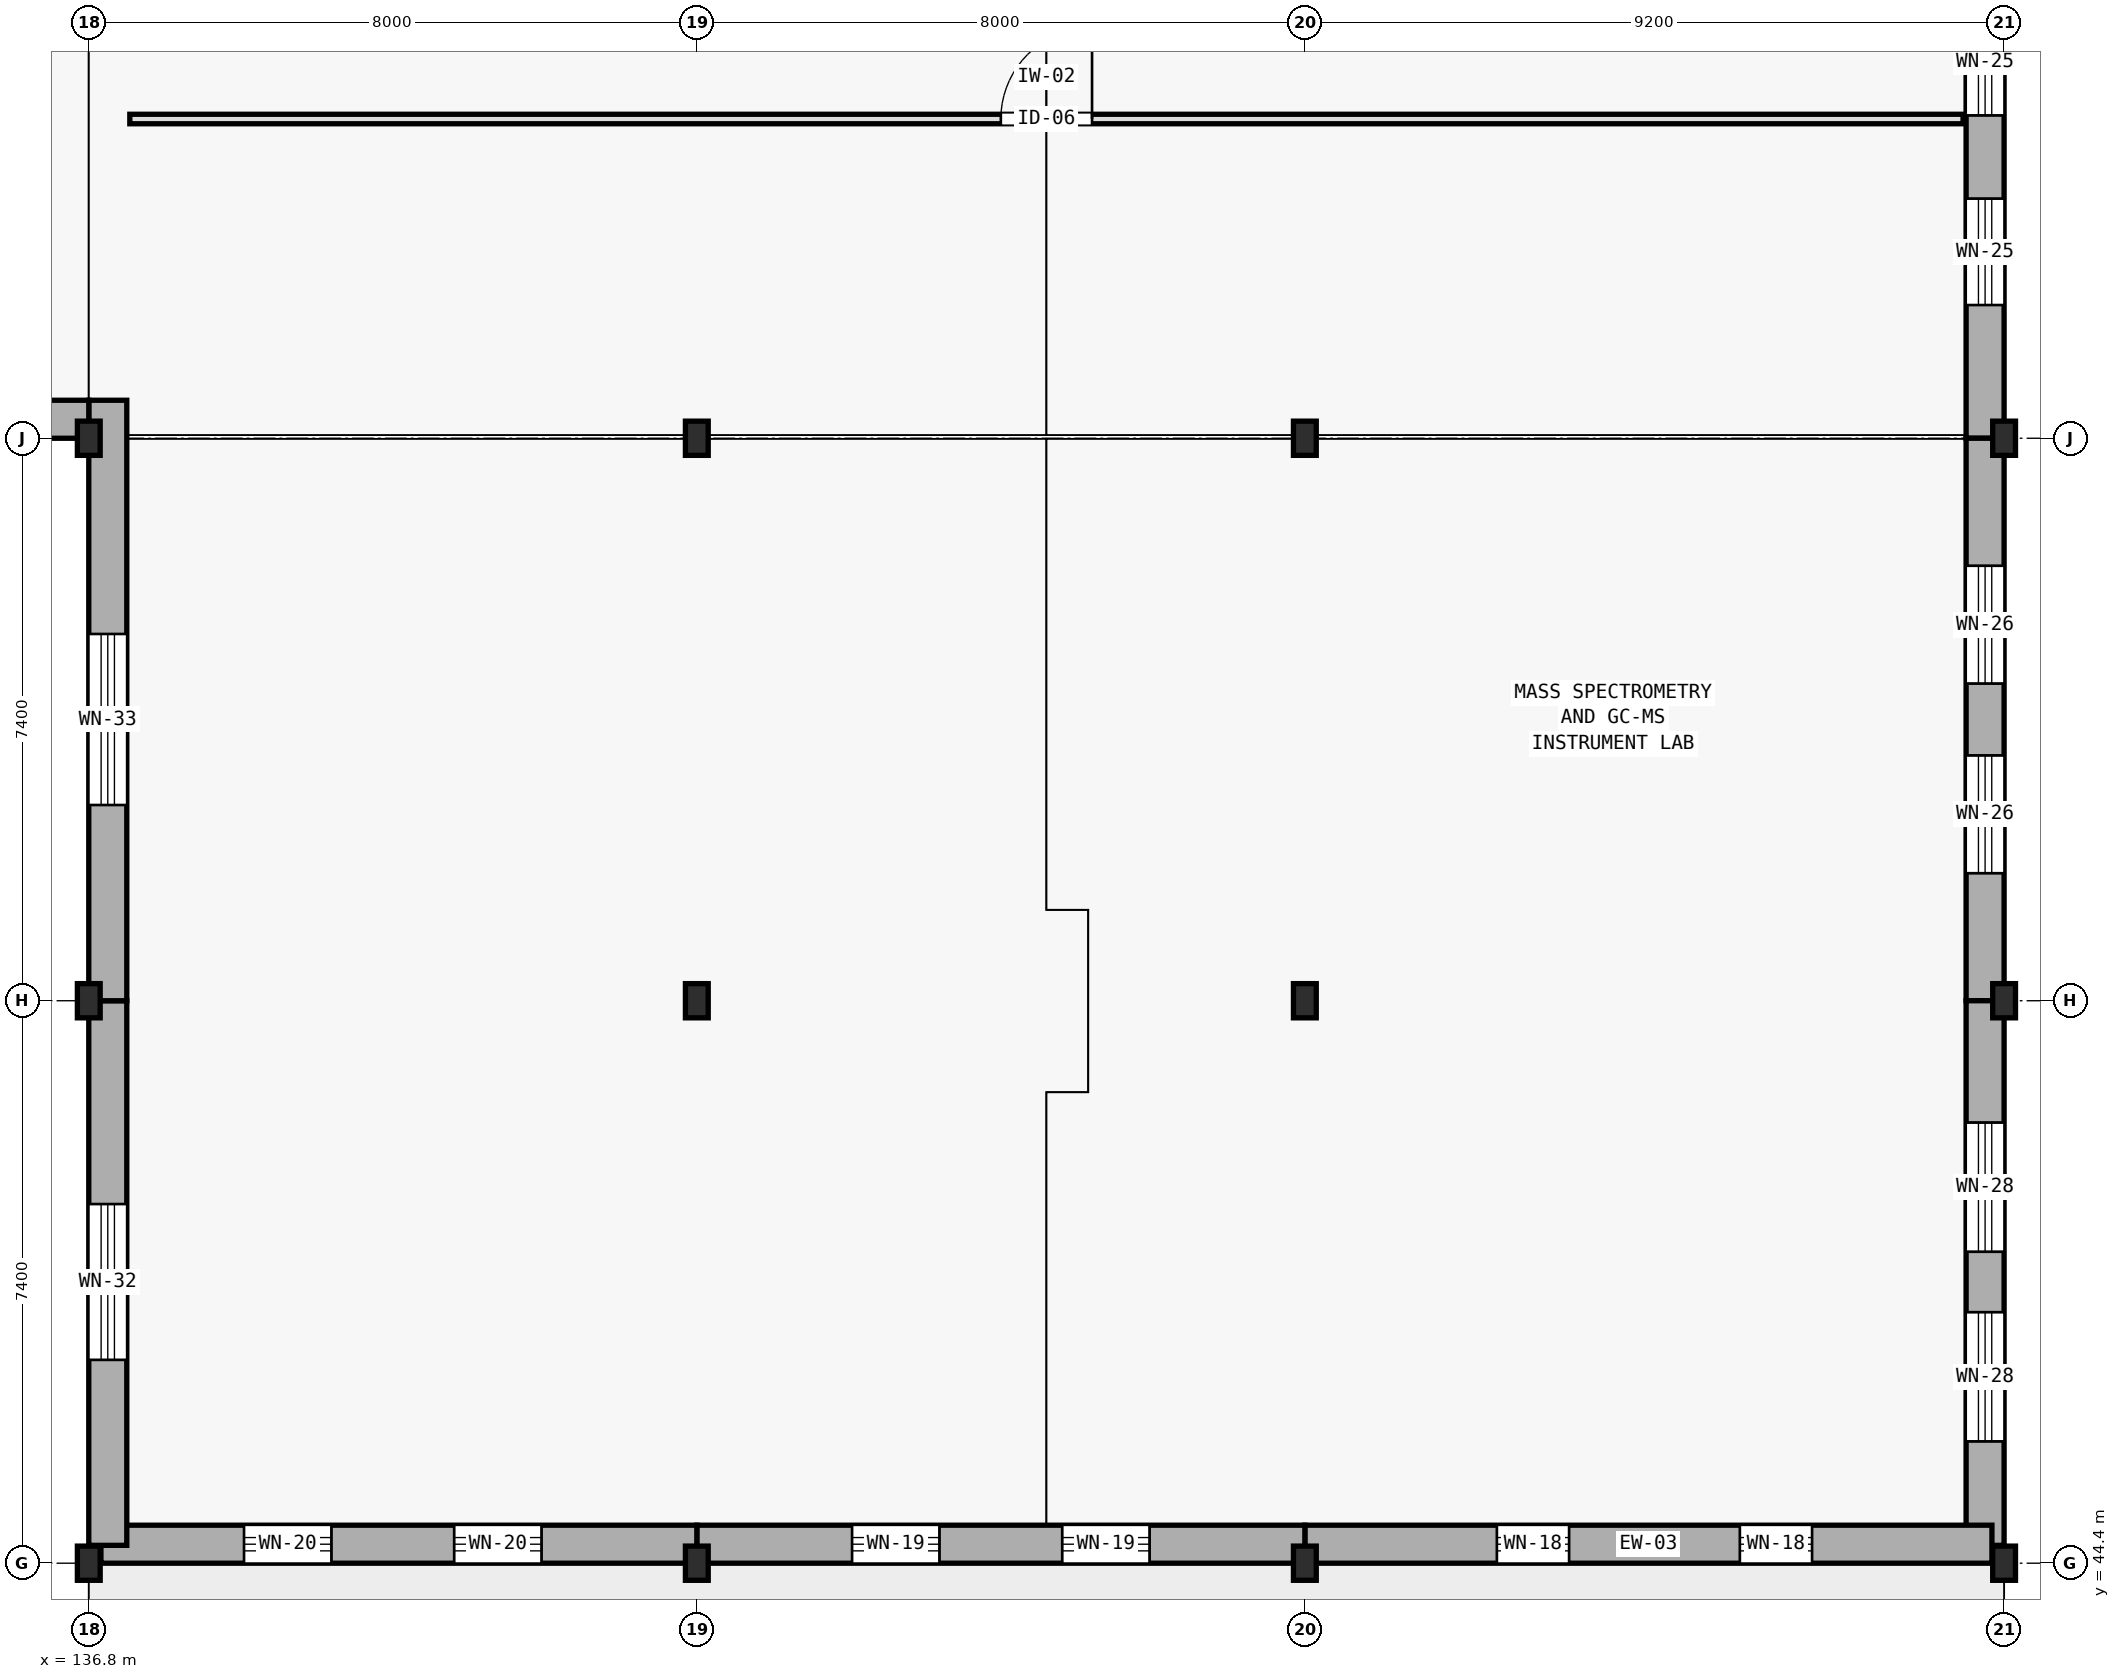
"""IFC4 building model, lengths in metres.
Left out: names, types, materials, properties, quantities, classifications, styles, units other than length and angle.
Written with IfcOpenShell. Run it as: python <this file> out.ifc"""

import sys

from ifc_helpers import new_model, si_unit, direction, frame, frame_2d, origin, origin_2d, place, context, subcontext, project, spatial, rectangle, i_section, extrude, element, fill, save


model = new_model("IFC4")
c1 = context("Model", 3, precision=1e-05, world=origin(), true_north=direction((0.0, 1.0)))
c2 = subcontext(c1, "Body", "Model", "MODEL_VIEW")
j1 = project(units=[si_unit("LENGTHUNIT", "METRE"), si_unit("PLANEANGLEUNIT", "RADIAN")], contexts=[c1])
p1 = place(None, origin())
s1 = spatial("IfcSite", under=j1, at=p1, CompositionType="ELEMENT")
p2 = place(p1, origin())
s2 = spatial("IfcBuilding", under=s1, at=p2, CompositionType="ELEMENT")
p3 = place(p2, frame((0.0, 0.0, 14.1)))
s3 = spatial("IfcBuildingStorey", under=s2, at=p3, CompositionType="ELEMENT", Elevation=14.1)
for number, where, z_axis, x_axis in (
    (1, (136.8, 44.4, 0.0), (0.0, 0.0, 1.0), (1.0, 0.0, 0.0)),
    (2, (136.8, 51.8, 0.0), (0.0, 0.0, 1.0), (1.0, 0.0, 0.0)),
    (3, (136.8, 59.2, 0.0), (0.0, 0.0, 1.0), (1.0, 0.0, 0.0)),
    (4, (144.8, 44.4, 0.0), (0.0, 0.0, 1.0), (1.0, 0.0, 0.0)),
    (5, (144.8, 51.8, 0.0), (0.0, 0.0, 1.0), (1.0, 0.0, 0.0)),
    (6, (144.8, 59.2, 0.0), (0.0, 0.0, 1.0), (1.0, 0.0, 0.0)),
    (7, (152.8, 44.4, 0.0), (0.0, 0.0, 1.0), (1.0, 0.0, 0.0)),
    (8, (152.8, 51.8, 0.0), (0.0, 0.0, 1.0), (1.0, 0.0, 0.0)),
    (9, (152.8, 59.2, 0.0), (0.0, 0.0, 1.0), (1.0, 0.0, 0.0)),
    (10, (162.0, 44.4, 0.0), (0.0, 0.0, 1.0), (1.0, 0.0, 0.0)),
    (11, (162.0, 51.8, 0.0), (0.0, 0.0, 1.0), (1.0, 0.0, 0.0)),
    (12, (162.0, 59.2, 0.0), (0.0, 0.0, 1.0), (1.0, 0.0, 0.0)),
):
    element("IfcColumn", number, at=place(p3, frame(where, z_axis=z_axis, x_axis=x_axis)), inside=s3, PredefinedType="COLUMN", context=c2, shape_type="SweptSolid", body=[
        extrude(i_section(OverallWidth=0.3, OverallDepth=0.45, WebThickness=0.014, FlangeThickness=0.026, FilletRadius=0.027, at=origin_2d()), origin(), (0.0, 0.0, 1.0), 4.0),
    ])
p4 = place(p3, frame((161.75, 66.6, 0.0), z_axis=(0.0, 0.0, 1.0), x_axis=(0.0, -1.0, 0.0)))
e13 = element("IfcWall", 13, at=p4, inside=s3, PredefinedType="STANDARD", context=c2, shape_type="SweptSolid", body=[
    extrude(rectangle(XDim=7.4, YDim=0.5, at=frame_2d((3.7, 0.0))), origin(), (0.0, 0.0, 1.0), 3.72),
])
p5 = place(p4, frame((1.753, 0.0, 0.9)))
e14 = element("IfcOpeningElement", 14, at=p5, cuts=e13, PredefinedType="OPENING", context=c2, shape_type="SweptSolid", body=[
    extrude(rectangle(XDim=1.4, YDim=2.15, at=frame_2d((0.7, 1.075))), frame((0.0, 0.26, 0.0), z_axis=(0.0, -1.0, 0.0), x_axis=(1.0, 0.0, 0.0)), (0.0, 0.0, 1.0), 0.52),
])
p6 = place(p4, frame((4.247, 0.0, 0.9)))
e15 = element("IfcOpeningElement", 15, at=p6, cuts=e13, PredefinedType="OPENING", context=c2, shape_type="SweptSolid", body=[
    extrude(rectangle(XDim=1.4, YDim=2.15, at=frame_2d((0.7, 1.075))), frame((0.0, 0.26, 0.0), z_axis=(0.0, -1.0, 0.0), x_axis=(1.0, 0.0, 0.0)), (0.0, 0.0, 1.0), 0.52),
])
p7 = place(p3, frame((161.75, 59.2, 0.0), z_axis=(0.0, 0.0, 1.0), x_axis=(0.0, -1.0, 0.0)))
e16 = element("IfcWall", 16, at=p7, inside=s3, PredefinedType="STANDARD", context=c2, shape_type="SweptSolid", body=[
    extrude(rectangle(XDim=7.4, YDim=0.5, at=frame_2d((3.7, 0.0))), origin(), (0.0, 0.0, 1.0), 3.72),
])
p8 = place(p7, frame((1.677, 0.0, 0.9)))
e17 = element("IfcOpeningElement", 17, at=p8, cuts=e16, PredefinedType="OPENING", context=c2, shape_type="SweptSolid", body=[
    extrude(rectangle(XDim=1.55, YDim=1.85, at=frame_2d((0.775, 0.925))), frame((0.0, 0.26, 0.0), z_axis=(0.0, -1.0, 0.0), x_axis=(1.0, 0.0, 0.0)), (0.0, 0.0, 1.0), 0.52),
])
p9 = place(p7, frame((4.172, 0.0, 0.9)))
e18 = element("IfcOpeningElement", 18, at=p9, cuts=e16, PredefinedType="OPENING", context=c2, shape_type="SweptSolid", body=[
    extrude(rectangle(XDim=1.55, YDim=1.85, at=frame_2d((0.775, 0.925))), frame((0.0, 0.26, 0.0), z_axis=(0.0, -1.0, 0.0), x_axis=(1.0, 0.0, 0.0)), (0.0, 0.0, 1.0), 0.52),
])
p10 = place(p3, frame((161.75, 51.8, 0.0), z_axis=(0.0, 0.0, 1.0), x_axis=(0.0, -1.0, 0.0)))
e19 = element("IfcWall", 19, at=p10, inside=s3, PredefinedType="STANDARD", context=c2, shape_type="SweptSolid", body=[
    extrude(rectangle(XDim=7.165, YDim=0.5, at=frame_2d((3.583, 0.0))), origin(), (0.0, 0.0, 1.0), 3.72),
])
p11 = place(p10, frame((1.603, 0.0, 0.9)))
e20 = element("IfcOpeningElement", 20, at=p11, cuts=e19, PredefinedType="OPENING", context=c2, shape_type="SweptSolid", body=[
    extrude(rectangle(XDim=1.7, YDim=2.0, at=frame_2d((0.85, 1.0))), frame((0.0, 0.26, 0.0), z_axis=(0.0, -1.0, 0.0), x_axis=(1.0, 0.0, 0.0)), (0.0, 0.0, 1.0), 0.52),
])
p12 = place(p10, frame((4.097, 0.0, 0.9)))
e21 = element("IfcOpeningElement", 21, at=p12, cuts=e19, PredefinedType="OPENING", context=c2, shape_type="SweptSolid", body=[
    extrude(rectangle(XDim=1.7, YDim=2.0, at=frame_2d((0.85, 1.0))), frame((0.0, 0.26, 0.0), z_axis=(0.0, -1.0, 0.0), x_axis=(1.0, 0.0, 0.0)), (0.0, 0.0, 1.0), 0.52),
])
p13 = place(p3, frame((161.84, 44.65, 0.0), z_axis=(0.0, 0.0, 1.0), x_axis=(-1.0, 0.0, 0.0)))
e22 = element("IfcWall", 22, at=p13, inside=s3, PredefinedType="STANDARD", context=c2, shape_type="SweptSolid", body=[
    extrude(rectangle(XDim=9.04, YDim=0.5, at=frame_2d((4.52, 0.0))), origin(), (0.0, 0.0, 1.0), 3.72),
])
p14 = place(p13, frame((2.367, 0.0, 0.9)))
e23 = element("IfcOpeningElement", 23, at=p14, cuts=e22, PredefinedType="OPENING", context=c2, shape_type="SweptSolid", body=[
    extrude(rectangle(XDim=0.95, YDim=2.2, at=frame_2d((0.475, 1.1))), frame((0.0, 0.26, 0.0), z_axis=(0.0, -1.0, 0.0), x_axis=(1.0, 0.0, 0.0)), (0.0, 0.0, 1.0), 0.52),
])
p15 = place(p13, frame((5.563, 0.0, 0.9)))
e24 = element("IfcOpeningElement", 24, at=p15, cuts=e22, PredefinedType="OPENING", context=c2, shape_type="SweptSolid", body=[
    extrude(rectangle(XDim=0.95, YDim=2.2, at=frame_2d((0.475, 1.1))), frame((0.0, 0.26, 0.0), z_axis=(0.0, -1.0, 0.0), x_axis=(1.0, 0.0, 0.0)), (0.0, 0.0, 1.0), 0.52),
])
p16 = place(p3, frame((152.8, 44.65, 0.0), z_axis=(0.0, 0.0, 1.0), x_axis=(-1.0, 0.0, 0.0)))
e25 = element("IfcWall", 25, at=p16, inside=s3, PredefinedType="STANDARD", context=c2, shape_type="SweptSolid", body=[
    extrude(rectangle(XDim=8.0, YDim=0.5, at=frame_2d((4.0, 0.0))), origin(), (0.0, 0.0, 1.0), 3.72),
])
p17 = place(p16, frame((2.042, 0.0, 1.35)))
e26 = element("IfcOpeningElement", 26, at=p17, cuts=e25, PredefinedType="OPENING", context=c2, shape_type="SweptSolid", body=[
    extrude(rectangle(XDim=1.15, YDim=1.5, at=frame_2d((0.575, 0.75))), frame((0.0, 0.26, 0.0), z_axis=(0.0, -1.0, 0.0), x_axis=(1.0, 0.0, 0.0)), (0.0, 0.0, 1.0), 0.52),
])
p18 = place(p16, frame((4.807, 0.0, 1.35)))
e27 = element("IfcOpeningElement", 27, at=p18, cuts=e25, PredefinedType="OPENING", context=c2, shape_type="SweptSolid", body=[
    extrude(rectangle(XDim=1.15, YDim=1.5, at=frame_2d((0.575, 0.75))), frame((0.0, 0.26, 0.0), z_axis=(0.0, -1.0, 0.0), x_axis=(1.0, 0.0, 0.0)), (0.0, 0.0, 1.0), 0.52),
])
p19 = place(p3, frame((144.8, 44.65, 0.0), z_axis=(0.0, 0.0, 1.0), x_axis=(-1.0, 0.0, 0.0)))
e28 = element("IfcWall", 28, at=p19, inside=s3, PredefinedType="STANDARD", context=c2, shape_type="SweptSolid", body=[
    extrude(rectangle(XDim=7.84, YDim=0.5, at=frame_2d((3.92, 0.0))), origin(), (0.0, 0.0, 1.0), 3.72),
])
p20 = place(p19, frame((2.042, 0.0, 0.9)))
e29 = element("IfcOpeningElement", 29, at=p20, cuts=e28, PredefinedType="OPENING", context=c2, shape_type="SweptSolid", body=[
    extrude(rectangle(XDim=1.15, YDim=1.85, at=frame_2d((0.575, 0.925))), frame((0.0, 0.26, 0.0), z_axis=(0.0, -1.0, 0.0), x_axis=(1.0, 0.0, 0.0)), (0.0, 0.0, 1.0), 0.52),
])
p21 = place(p19, frame((4.807, 0.0, 0.9)))
e30 = element("IfcOpeningElement", 30, at=p21, cuts=e28, PredefinedType="OPENING", context=c2, shape_type="SweptSolid", body=[
    extrude(rectangle(XDim=1.15, YDim=1.85, at=frame_2d((0.575, 0.925))), frame((0.0, 0.26, 0.0), z_axis=(0.0, -1.0, 0.0), x_axis=(1.0, 0.0, 0.0)), (0.0, 0.0, 1.0), 0.52),
])
p22 = place(p3, frame((137.05, 44.635, 0.0), z_axis=(0.0, 0.0, 1.0), x_axis=(0.0, 1.0, 0.0)))
e31 = element("IfcWall", 31, at=p22, inside=s3, PredefinedType="STANDARD", context=c2, shape_type="SweptSolid", body=[
    extrude(rectangle(XDim=7.165, YDim=0.5, at=frame_2d((3.583, 0.0))), origin(), (0.0, 0.0, 1.0), 3.72),
])
p23 = place(p22, frame((2.44, 0.0, 0.9)))
e32 = element("IfcOpeningElement", 32, at=p23, cuts=e31, PredefinedType="OPENING", context=c2, shape_type="SweptSolid", body=[
    extrude(rectangle(XDim=2.05, YDim=1.75, at=frame_2d((1.025, 0.875))), frame((0.0, 0.26, 0.0), z_axis=(0.0, -1.0, 0.0), x_axis=(1.0, 0.0, 0.0)), (0.0, 0.0, 1.0), 0.52),
])
p24 = place(p3, frame((137.05, 51.8, 0.0), z_axis=(0.0, 0.0, 1.0), x_axis=(0.0, 1.0, 0.0)))
e33 = element("IfcWall", 33, at=p24, inside=s3, PredefinedType="STANDARD", context=c2, shape_type="SweptSolid", body=[
    extrude(rectangle(XDim=7.9, YDim=0.5, at=frame_2d((3.95, 0.0))), origin(), (0.0, 0.0, 1.0), 3.72),
])
p25 = place(p24, frame((2.575, 0.0, 1.35)))
e34 = element("IfcOpeningElement", 34, at=p25, cuts=e33, PredefinedType="OPENING", context=c2, shape_type="SweptSolid", body=[
    extrude(rectangle(XDim=2.25, YDim=1.55, at=frame_2d((1.125, 0.775))), frame((0.0, 0.26, 0.0), z_axis=(0.0, -1.0, 0.0), x_axis=(1.0, 0.0, 0.0)), (0.0, 0.0, 1.0), 0.52),
])
p26 = place(p3, frame((136.8, 59.45, 0.0), z_axis=(0.0, 0.0, 1.0), x_axis=(-1.0, 0.0, 0.0)))
e35 = element("IfcWall", 35, at=p26, inside=s3, PredefinedType="STANDARD", context=c2, shape_type="SweptSolid", body=[
    extrude(rectangle(XDim=8.0, YDim=0.5, at=frame_2d((4.0, 0.0))), origin(), (0.0, 0.0, 1.0), 3.72),
])
p27 = place(p26, frame((2.775, 0.0, 0.9)))
e36 = element("IfcOpeningElement", 36, at=p27, cuts=e35, PredefinedType="OPENING", context=c2, shape_type="SweptSolid", body=[
    extrude(rectangle(XDim=2.45, YDim=2.2, at=frame_2d((1.225, 1.1))), frame((0.0, 0.26, 0.0), z_axis=(0.0, -1.0, 0.0), x_axis=(1.0, 0.0, 0.0)), (0.0, 0.0, 1.0), 0.52),
])
p28 = place(p3, frame((137.34, 63.4, 0.0), z_axis=(0.0, 0.0, 1.0), x_axis=(1.0, 0.0, 0.0)))
e37 = element("IfcWall", 37, at=p28, inside=s3, PredefinedType="PARTITIONING", context=c2, shape_type="SweptSolid", body=[
    extrude(rectangle(XDim=24.12, YDim=0.125, at=frame_2d((12.06, 0.0))), origin(), (0.0, 0.0, 1.0), 3.21),
])
p29 = place(p28, frame((11.46, 0.0, 0.0)))
e38 = element("IfcOpeningElement", 38, at=p29, cuts=e37, PredefinedType="OPENING", context=c2, shape_type="SweptSolid", body=[
    extrude(rectangle(XDim=1.2, YDim=2.2, at=frame_2d((0.6, 1.1))), frame((0.0, 0.073, 0.0), z_axis=(0.0, -1.0, 0.0), x_axis=(1.0, 0.0, 0.0)), (0.0, 0.0, 1.0), 0.145),
])
p30 = place(p5, origin())
e39 = element("IfcWindow", 39, at=p30, inside=s3, PartitioningType="SINGLE_PANEL", PredefinedType="WINDOW", context=c2, shape_type="SweptSolid", body=[
    extrude(rectangle(XDim=1.4, YDim=2.15, at=frame_2d((0.7, 1.075))), frame((0.0, 0.03, 0.0), z_axis=(0.0, -1.0, 0.0), x_axis=(1.0, 0.0, 0.0)), (0.0, 0.0, 1.0), 0.06),
])
fill(e14, e39)
p31 = place(p6, origin())
e40 = element("IfcWindow", 40, at=p31, inside=s3, PartitioningType="SINGLE_PANEL", PredefinedType="WINDOW", context=c2, shape_type="SweptSolid", body=[
    extrude(rectangle(XDim=1.4, YDim=2.15, at=frame_2d((0.7, 1.075))), frame((0.0, 0.03, 0.0), z_axis=(0.0, -1.0, 0.0), x_axis=(1.0, 0.0, 0.0)), (0.0, 0.0, 1.0), 0.06),
])
fill(e15, e40)
p32 = place(p8, origin())
e41 = element("IfcWindow", 41, at=p32, inside=s3, PartitioningType="SINGLE_PANEL", PredefinedType="WINDOW", context=c2, shape_type="SweptSolid", body=[
    extrude(rectangle(XDim=1.55, YDim=1.85, at=frame_2d((0.775, 0.925))), frame((0.0, 0.03, 0.0), z_axis=(0.0, -1.0, 0.0), x_axis=(1.0, 0.0, 0.0)), (0.0, 0.0, 1.0), 0.06),
])
fill(e17, e41)
p33 = place(p9, origin())
e42 = element("IfcWindow", 42, at=p33, inside=s3, PartitioningType="SINGLE_PANEL", PredefinedType="WINDOW", context=c2, shape_type="SweptSolid", body=[
    extrude(rectangle(XDim=1.55, YDim=1.85, at=frame_2d((0.775, 0.925))), frame((0.0, 0.03, 0.0), z_axis=(0.0, -1.0, 0.0), x_axis=(1.0, 0.0, 0.0)), (0.0, 0.0, 1.0), 0.06),
])
fill(e18, e42)
p34 = place(p11, origin())
e43 = element("IfcWindow", 43, at=p34, inside=s3, PartitioningType="SINGLE_PANEL", PredefinedType="WINDOW", context=c2, shape_type="SweptSolid", body=[
    extrude(rectangle(XDim=1.7, YDim=2.0, at=frame_2d((0.85, 1.0))), frame((0.0, 0.03, 0.0), z_axis=(0.0, -1.0, 0.0), x_axis=(1.0, 0.0, 0.0)), (0.0, 0.0, 1.0), 0.06),
])
fill(e20, e43)
p35 = place(p12, origin())
e44 = element("IfcWindow", 44, at=p35, inside=s3, PartitioningType="SINGLE_PANEL", PredefinedType="WINDOW", context=c2, shape_type="SweptSolid", body=[
    extrude(rectangle(XDim=1.7, YDim=2.0, at=frame_2d((0.85, 1.0))), frame((0.0, 0.03, 0.0), z_axis=(0.0, -1.0, 0.0), x_axis=(1.0, 0.0, 0.0)), (0.0, 0.0, 1.0), 0.06),
])
fill(e21, e44)
p36 = place(p14, origin())
e45 = element("IfcWindow", 45, at=p36, inside=s3, PartitioningType="SINGLE_PANEL", PredefinedType="WINDOW", context=c2, shape_type="SweptSolid", body=[
    extrude(rectangle(XDim=0.95, YDim=2.2, at=frame_2d((0.475, 1.1))), frame((0.0, 0.03, 0.0), z_axis=(0.0, -1.0, 0.0), x_axis=(1.0, 0.0, 0.0)), (0.0, 0.0, 1.0), 0.06),
])
fill(e23, e45)
p37 = place(p15, origin())
e46 = element("IfcWindow", 46, at=p37, inside=s3, PartitioningType="SINGLE_PANEL", PredefinedType="WINDOW", context=c2, shape_type="SweptSolid", body=[
    extrude(rectangle(XDim=0.95, YDim=2.2, at=frame_2d((0.475, 1.1))), frame((0.0, 0.03, 0.0), z_axis=(0.0, -1.0, 0.0), x_axis=(1.0, 0.0, 0.0)), (0.0, 0.0, 1.0), 0.06),
])
fill(e24, e46)
p38 = place(p17, origin())
e47 = element("IfcWindow", 47, at=p38, inside=s3, PartitioningType="SINGLE_PANEL", PredefinedType="WINDOW", context=c2, shape_type="SweptSolid", body=[
    extrude(rectangle(XDim=1.15, YDim=1.5, at=frame_2d((0.575, 0.75))), frame((0.0, 0.03, 0.0), z_axis=(0.0, -1.0, 0.0), x_axis=(1.0, 0.0, 0.0)), (0.0, 0.0, 1.0), 0.06),
])
fill(e26, e47)
p39 = place(p18, origin())
e48 = element("IfcWindow", 48, at=p39, inside=s3, PartitioningType="SINGLE_PANEL", PredefinedType="WINDOW", context=c2, shape_type="SweptSolid", body=[
    extrude(rectangle(XDim=1.15, YDim=1.5, at=frame_2d((0.575, 0.75))), frame((0.0, 0.03, 0.0), z_axis=(0.0, -1.0, 0.0), x_axis=(1.0, 0.0, 0.0)), (0.0, 0.0, 1.0), 0.06),
])
fill(e27, e48)
p40 = place(p20, origin())
e49 = element("IfcWindow", 49, at=p40, inside=s3, PartitioningType="SINGLE_PANEL", PredefinedType="WINDOW", context=c2, shape_type="SweptSolid", body=[
    extrude(rectangle(XDim=1.15, YDim=1.85, at=frame_2d((0.575, 0.925))), frame((0.0, 0.03, 0.0), z_axis=(0.0, -1.0, 0.0), x_axis=(1.0, 0.0, 0.0)), (0.0, 0.0, 1.0), 0.06),
])
fill(e29, e49)
p41 = place(p21, origin())
e50 = element("IfcWindow", 50, at=p41, inside=s3, PartitioningType="SINGLE_PANEL", PredefinedType="WINDOW", context=c2, shape_type="SweptSolid", body=[
    extrude(rectangle(XDim=1.15, YDim=1.85, at=frame_2d((0.575, 0.925))), frame((0.0, 0.03, 0.0), z_axis=(0.0, -1.0, 0.0), x_axis=(1.0, 0.0, 0.0)), (0.0, 0.0, 1.0), 0.06),
])
fill(e30, e50)
p42 = place(p23, origin())
e51 = element("IfcWindow", 51, at=p42, inside=s3, PartitioningType="SINGLE_PANEL", PredefinedType="WINDOW", context=c2, shape_type="SweptSolid", body=[
    extrude(rectangle(XDim=2.05, YDim=1.75, at=frame_2d((1.025, 0.875))), frame((0.0, 0.03, 0.0), z_axis=(0.0, -1.0, 0.0), x_axis=(1.0, 0.0, 0.0)), (0.0, 0.0, 1.0), 0.06),
])
fill(e32, e51)
p43 = place(p25, origin())
e52 = element("IfcWindow", 52, at=p43, inside=s3, PartitioningType="SINGLE_PANEL", PredefinedType="WINDOW", context=c2, shape_type="SweptSolid", body=[
    extrude(rectangle(XDim=2.25, YDim=1.55, at=frame_2d((1.125, 0.775))), frame((0.0, 0.03, 0.0), z_axis=(0.0, -1.0, 0.0), x_axis=(1.0, 0.0, 0.0)), (0.0, 0.0, 1.0), 0.06),
])
fill(e34, e52)
p44 = place(p29, origin())
e53 = element("IfcDoor", 53, at=p44, inside=s3, OperationType="SINGLE_SWING_RIGHT", PredefinedType="DOOR", context=c2, shape_type="SweptSolid", body=[
    extrude(rectangle(XDim=1.2, YDim=2.2, at=frame_2d((0.6, 1.1))), frame((0.0, 0.025, 0.0), z_axis=(0.0, -1.0, 0.0), x_axis=(1.0, 0.0, 0.0)), (0.0, 0.0, 1.0), 0.05),
])
fill(e38, e53)
save(model, sys.argv[1])
